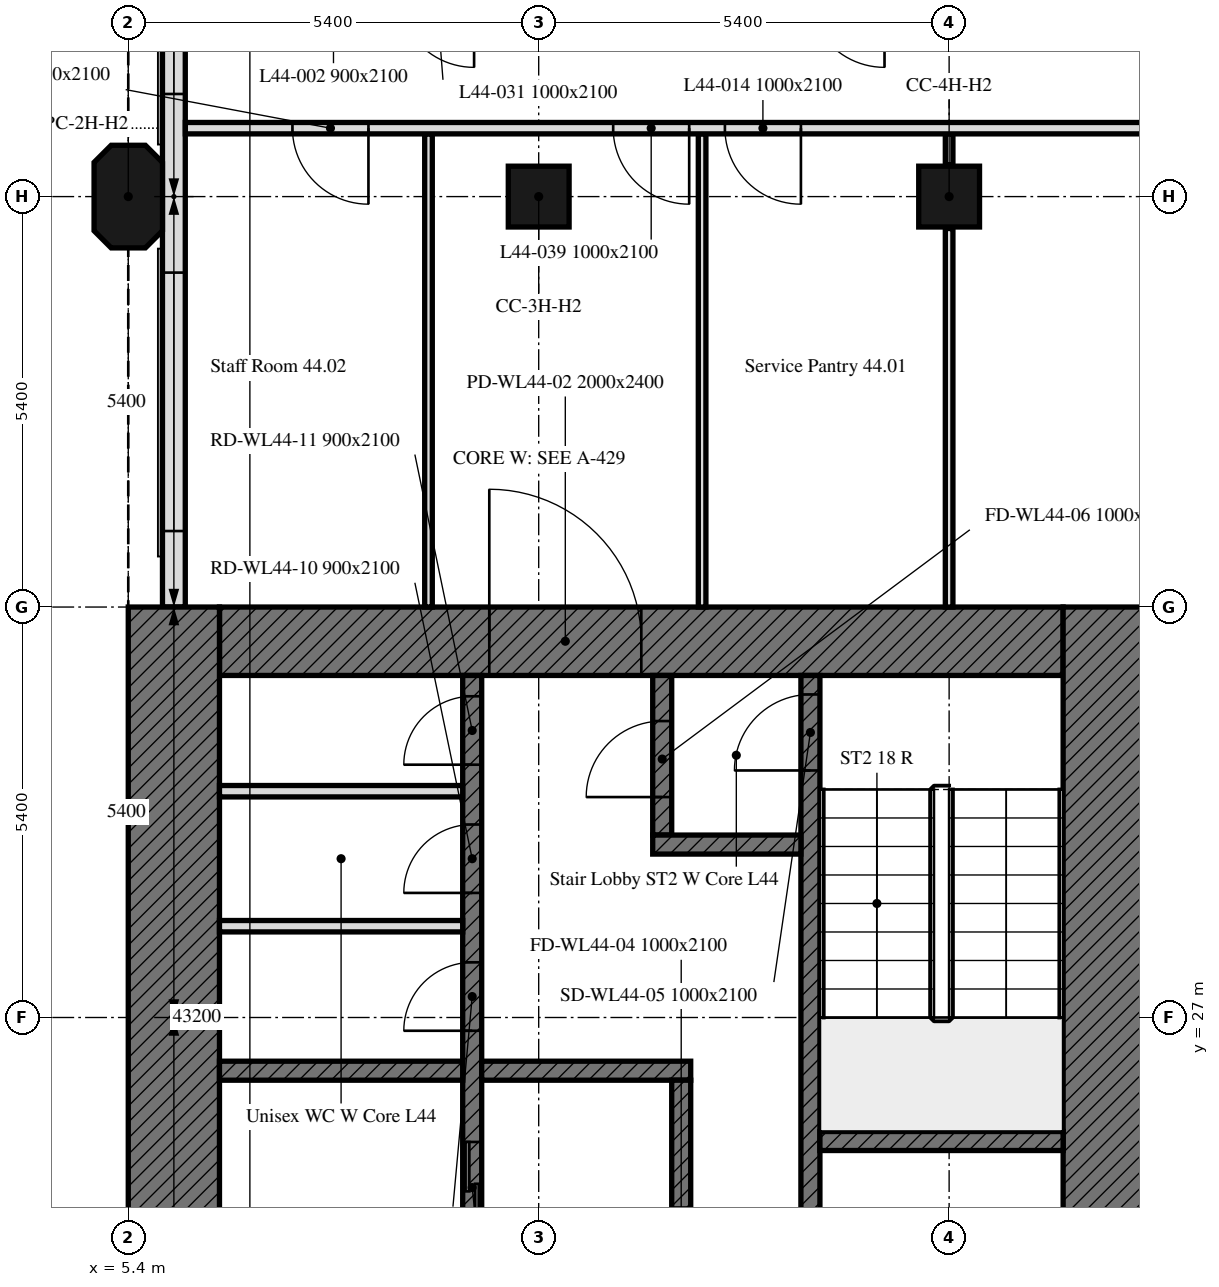
"""IFC4 building model, lengths in metres.
Left out: names, types, materials, properties, quantities, classifications, styles, units other than length and angle.
Written with IfcOpenShell. Run it as: python <this file> out.ifc"""

import sys

from ifc_helpers import new_model, si_unit, direction, frame, frame_2d, origin, origin_2d, place, context, subcontext, project, spatial, polyline, rectangle, outline, extrude, element, fill, save


model = new_model("IFC4")
c1 = context("Model", 3, precision=1e-05, world=origin(), true_north=direction((0.0, 1.0)))
c2 = subcontext(c1, "Body", "Model", "MODEL_VIEW")
j1 = project(units=[si_unit("LENGTHUNIT", "METRE"), si_unit("PLANEANGLEUNIT", "RADIAN")], contexts=[c1])
p1 = place(None, origin())
s1 = spatial("IfcSite", under=j1, at=p1, CompositionType="ELEMENT")
p2 = place(p1, origin())
s2 = spatial("IfcBuilding", under=s1, at=p2, CompositionType="ELEMENT")
p3 = place(p2, frame((0.0, 0.0, 184.0)))
s3 = spatial("IfcBuildingStorey", under=s2, at=p3, CompositionType="ELEMENT", Elevation=184.0)
p4 = place(p3, frame((5.4, 37.8, 0.0), z_axis=(0.0, 0.0, 1.0), x_axis=(0.0, 1.0, 0.0)))
e1 = element("IfcColumn", 1, at=p4, inside=s3, PredefinedType="COLUMN", context=c2, shape_type="SweptSolid", body=[
    extrude(outline(polyline([(-0.45, -0.45), (0.45, -0.45), (0.675, -0.225), (0.675, 0.225), (0.45, 0.45), (-0.45, 0.45), (-0.675, 0.225), (-0.675, -0.225), (-0.45, -0.45)])), origin(), (0.0, 0.0, 1.0), 3.0),
])
for number, where, z_axis, x_axis in (
    (2, (10.8, 37.8, 0.0), (0.0, 0.0, 1.0), (1.0, 0.0, 0.0)),
    (3, (16.2, 37.8, 0.0), (0.0, 0.0, 1.0), (1.0, 0.0, 0.0)),
):
    element("IfcColumn", number, at=place(p3, frame(where, z_axis=z_axis, x_axis=x_axis)), inside=s3, PredefinedType="COLUMN", context=c2, shape_type="SweptSolid", body=[
        extrude(rectangle(XDim=0.8, YDim=0.8, at=origin_2d()), origin(), (0.0, 0.0, 1.0), 3.0),
    ])
p5 = place(p3, frame((6.0, 43.014, 0.0), z_axis=(0.0, 0.0, 1.0), x_axis=(0.0, -1.0, 0.0)))
e4 = element("IfcWall", 4, at=p5, inside=s3, PredefinedType="SOLIDWALL", context=c2, shape_type="SweptSolid", body=[
    extrude(rectangle(XDim=10.614, YDim=0.3, at=frame_2d((5.307, 0.0))), origin(), (0.0, 0.0, 1.0), 3.0),
])
p6 = place(p5, frame((1.164, 0.0, 0.9)))
e5 = element("IfcOpeningElement", 5, at=p6, cuts=e4, PredefinedType="OPENING", context=c2, shape_type="SweptSolid", body=[
    extrude(rectangle(XDim=1.1, YDim=1.7, at=frame_2d((0.55, 0.85))), frame((0.0, 0.16, 0.0), z_axis=(0.0, -1.0, 0.0), x_axis=(1.0, 0.0, 0.0)), (0.0, 0.0, 1.0), 0.32),
])
p7 = place(p5, frame((2.764, 0.0, 0.9)))
e6 = element("IfcOpeningElement", 6, at=p7, cuts=e4, PredefinedType="OPENING", context=c2, shape_type="SweptSolid", body=[
    extrude(rectangle(XDim=1.1, YDim=1.7, at=frame_2d((0.55, 0.85))), frame((0.0, 0.16, 0.0), z_axis=(0.0, -1.0, 0.0), x_axis=(1.0, 0.0, 0.0)), (0.0, 0.0, 1.0), 0.32),
])
p8 = place(p5, frame((6.214, 0.0, 0.9)))
e7 = element("IfcOpeningElement", 7, at=p8, cuts=e4, PredefinedType="OPENING", context=c2, shape_type="SweptSolid", body=[
    extrude(rectangle(XDim=3.4, YDim=1.7, at=frame_2d((1.7, 0.85))), frame((0.0, 0.16, 0.0), z_axis=(0.0, -1.0, 0.0), x_axis=(1.0, 0.0, 0.0)), (0.0, 0.0, 1.0), 0.32),
])
p9 = place(p3, frame((6.6, 31.95, 0.0), z_axis=(0.0, 0.0, 1.0), x_axis=(1.0, 0.0, 0.0)))
e8 = element("IfcWall", 8, at=p9, inside=s3, PredefinedType="SOLIDWALL", context=c2, shape_type="SweptSolid", body=[
    extrude(rectangle(XDim=11.1, YDim=0.9, at=frame_2d((5.55, 0.0))), origin(), (0.0, 0.0, 1.0), 3.0),
])
p10 = place(p9, frame((3.55, 0.0, 0.0)))
e9 = element("IfcOpeningElement", 9, at=p10, cuts=e8, PredefinedType="OPENING", context=c2, shape_type="SweptSolid", body=[
    extrude(rectangle(XDim=2.0, YDim=2.4, at=frame_2d((1.0, 1.2))), frame((0.0, 0.45, 0.0), z_axis=(0.0, -1.0, 0.0), x_axis=(1.0, 0.0, 0.0)), (0.0, 0.0, 1.0), 0.9),
])
for number, where, z_axis, x_axis in (
    (10, (6.0, 16.2, 0.0), (0.0, 0.0, 1.0), (0.0, 1.0, 0.0)),
    (11, (18.3, 32.4, 0.0), (0.0, 0.0, 1.0), (0.0, -1.0, 0.0)),
):
    element("IfcWall", number, at=place(p3, frame(where, z_axis=z_axis, x_axis=x_axis)), inside=s3, PredefinedType="SOLIDWALL", context=c2, shape_type="SweptSolid", body=[
        extrude(rectangle(XDim=16.2, YDim=1.2, at=frame_2d((8.1, 0.0))), origin(), (0.0, 0.0, 1.0), 3.0),
    ])
p11 = place(p3, frame((9.925, 17.1, 0.0), z_axis=(0.0, 0.0, 1.0), x_axis=(0.0, 1.0, 0.0)))
e12 = element("IfcWall", 12, at=p11, inside=s3, PredefinedType="SOLIDWALL", context=c2, shape_type="SweptSolid", body=[
    extrude(rectangle(XDim=14.4, YDim=0.25, at=frame_2d((7.2, 0.0))), origin(), (0.0, 0.0, 1.0), 3.0),
])
p12 = place(p11, frame((4.6, 0.0, 0.0)))
e13 = element("IfcOpeningElement", 13, at=p12, cuts=e12, PredefinedType="OPENING", context=c2, shape_type="SweptSolid", body=[
    extrude(rectangle(XDim=1.0, YDim=2.1, at=frame_2d((0.5, 1.05))), frame((0.0, 0.125, 0.0), z_axis=(0.0, -1.0, 0.0), x_axis=(1.0, 0.0, 0.0)), (0.0, 0.0, 1.0), 0.25),
])
p13 = place(p11, frame((7.062, 0.0, 0.0)))
e14 = element("IfcOpeningElement", 14, at=p13, cuts=e12, PredefinedType="OPENING", context=c2, shape_type="SweptSolid", body=[
    extrude(rectangle(XDim=1.2, YDim=2.1, at=frame_2d((0.6, 1.05))), frame((0.0, 0.125, 0.0), z_axis=(0.0, -1.0, 0.0), x_axis=(1.0, 0.0, 0.0)), (0.0, 0.0, 1.0), 0.25),
])
p14 = place(p11, frame((9.726, 0.0, 0.0)))
e15 = element("IfcOpeningElement", 15, at=p14, cuts=e12, PredefinedType="OPENING", context=c2, shape_type="SweptSolid", body=[
    extrude(rectangle(XDim=0.9, YDim=2.1, at=frame_2d((0.45, 1.05))), frame((0.0, 0.125, 0.0), z_axis=(0.0, -1.0, 0.0), x_axis=(1.0, 0.0, 0.0)), (0.0, 0.0, 1.0), 0.25),
])
p15 = place(p11, frame((11.539, 0.0, 0.0)))
e16 = element("IfcOpeningElement", 16, at=p15, cuts=e12, PredefinedType="OPENING", context=c2, shape_type="SweptSolid", body=[
    extrude(rectangle(XDim=0.9, YDim=2.1, at=frame_2d((0.45, 1.05))), frame((0.0, 0.125, 0.0), z_axis=(0.0, -1.0, 0.0), x_axis=(1.0, 0.0, 0.0)), (0.0, 0.0, 1.0), 0.25),
])
p16 = place(p11, frame((13.226, 0.0, 0.0)))
e17 = element("IfcOpeningElement", 17, at=p16, cuts=e12, PredefinedType="OPENING", context=c2, shape_type="SweptSolid", body=[
    extrude(rectangle(XDim=0.9, YDim=2.1, at=frame_2d((0.45, 1.05))), frame((0.0, 0.125, 0.0), z_axis=(0.0, -1.0, 0.0), x_axis=(1.0, 0.0, 0.0)), (0.0, 0.0, 1.0), 0.25),
])
p17 = place(p3, frame((14.375, 17.1, 0.0), z_axis=(0.0, 0.0, 1.0), x_axis=(0.0, 1.0, 0.0)))
e18 = element("IfcWall", 18, at=p17, inside=s3, PredefinedType="SOLIDWALL", context=c2, shape_type="SweptSolid", body=[
    extrude(rectangle(XDim=14.4, YDim=0.25, at=frame_2d((7.2, 0.0))), origin(), (0.0, 0.0, 1.0), 3.0),
])
p18 = place(p17, frame((13.15, 0.0, 0.0)))
e19 = element("IfcOpeningElement", 19, at=p18, cuts=e18, PredefinedType="OPENING", context=c2, shape_type="SweptSolid", body=[
    extrude(rectangle(XDim=1.0, YDim=2.1, at=frame_2d((0.5, 1.05))), frame((0.0, 0.125, 0.0), z_axis=(0.0, -1.0, 0.0), x_axis=(1.0, 0.0, 0.0)), (0.0, 0.0, 1.0), 0.25),
])
p19 = place(p17, frame((0.6, 0.0, 0.0)))
e20 = element("IfcOpeningElement", 20, at=p19, cuts=e18, PredefinedType="OPENING", context=c2, shape_type="SweptSolid", body=[
    extrude(rectangle(XDim=1.1, YDim=2.1, at=frame_2d((0.55, 1.05))), frame((0.0, 0.125, 0.0), z_axis=(0.0, -1.0, 0.0), x_axis=(1.0, 0.0, 0.0)), (0.0, 0.0, 1.0), 0.25),
])
p20 = place(p17, frame((3.25, 0.0, 0.0)))
e21 = element("IfcOpeningElement", 21, at=p20, cuts=e18, PredefinedType="OPENING", context=c2, shape_type="SweptSolid", body=[
    extrude(rectangle(XDim=0.9, YDim=2.1, at=frame_2d((0.45, 1.05))), frame((0.0, 0.125, 0.0), z_axis=(0.0, -1.0, 0.0), x_axis=(1.0, 0.0, 0.0)), (0.0, 0.0, 1.0), 0.25),
])
for number, where, z_axis, x_axis in (
    (22, (14.5, 25.375, 0.0), (0.0, 0.0, 1.0), (1.0, 0.0, 0.0)),
    (23, (6.6, 26.3, 0.0), (0.0, 0.0, 1.0), (1.0, 0.0, 0.0)),
):
    element("IfcWall", number, at=place(p3, frame(where, z_axis=z_axis, x_axis=x_axis)), inside=s3, PredefinedType="SOLIDWALL", context=c2, shape_type="SweptSolid", body=[
        extrude(rectangle(XDim=3.2, YDim=0.25, at=frame_2d((1.6, 0.0))), origin(), (0.0, 0.0, 1.0), 3.0),
    ])
p21 = place(p3, frame((10.05, 26.3, 0.0), z_axis=(0.0, 0.0, 1.0), x_axis=(1.0, 0.0, 0.0)))
e24 = element("IfcWall", 24, at=p21, inside=s3, PredefinedType="SOLIDWALL", context=c2, shape_type="SweptSolid", body=[
    extrude(rectangle(XDim=2.75, YDim=0.25, at=frame_2d((1.375, 0.0))), origin(), (0.0, 0.0, 1.0), 3.0),
])
p22 = place(p3, frame((12.425, 29.4, 0.0), z_axis=(0.0, 0.0, 1.0), x_axis=(0.0, 1.0, 0.0)))
e25 = element("IfcWall", 25, at=p22, inside=s3, PredefinedType="SOLIDWALL", context=c2, shape_type="SweptSolid", body=[
    extrude(rectangle(XDim=2.1, YDim=0.25, at=frame_2d((1.05, 0.0))), origin(), (0.0, 0.0, 1.0), 3.0),
])
p23 = place(p22, frame((0.5, 0.0, 0.0)))
e26 = element("IfcOpeningElement", 26, at=p23, cuts=e25, PredefinedType="OPENING", context=c2, shape_type="SweptSolid", body=[
    extrude(rectangle(XDim=1.0, YDim=2.1, at=frame_2d((0.5, 1.05))), frame((0.0, 0.125, 0.0), z_axis=(0.0, -1.0, 0.0), x_axis=(1.0, 0.0, 0.0)), (0.0, 0.0, 1.0), 0.25),
])
p24 = place(p3, frame((12.3, 29.275, 0.0), z_axis=(0.0, 0.0, 1.0), x_axis=(1.0, 0.0, 0.0)))
e27 = element("IfcWall", 27, at=p24, inside=s3, PredefinedType="SOLIDWALL", context=c2, shape_type="SweptSolid", body=[
    extrude(rectangle(XDim=1.95, YDim=0.25, at=frame_2d((0.975, 0.0))), origin(), (0.0, 0.0, 1.0), 3.0),
])
p25 = place(p3, frame((12.675, 20.55, 0.0), z_axis=(0.0, 0.0, 1.0), x_axis=(0.0, 1.0, 0.0)))
e28 = element("IfcWall", 28, at=p25, inside=s3, PredefinedType="SOLIDWALL", context=c2, shape_type="SweptSolid", body=[
    extrude(rectangle(XDim=5.625, YDim=0.25, at=frame_2d((2.812, 0.0))), origin(), (0.0, 0.0, 1.0), 3.0),
])
p26 = place(p25, frame((2.95, 0.0, 0.0)))
e29 = element("IfcOpeningElement", 29, at=p26, cuts=e28, PredefinedType="OPENING", context=c2, shape_type="SweptSolid", body=[
    extrude(rectangle(XDim=1.0, YDim=2.1, at=frame_2d((0.5, 1.05))), frame((0.0, 0.125, 0.0), z_axis=(0.0, -1.0, 0.0), x_axis=(1.0, 0.0, 0.0)), (0.0, 0.0, 1.0), 0.25),
])
for number, where, z_axis, x_axis in (
    (30, (6.6, 28.201, 0.0), (0.0, 0.0, 1.0), (1.0, 0.0, 0.0)),
    (31, (6.6, 29.977, 0.0), (0.0, 0.0, 1.0), (1.0, 0.0, 0.0)),
):
    element("IfcWall", number, at=place(p3, frame(where, z_axis=z_axis, x_axis=x_axis)), inside=s3, PredefinedType="PARTITIONING", context=c2, shape_type="SweptSolid", body=[
        extrude(rectangle(XDim=3.2, YDim=0.15, at=frame_2d((1.6, 0.0))), origin(), (0.0, 0.0, 1.0), 3.0),
    ])
p27 = place(p3, frame((16.2, 38.625, 0.0), z_axis=(0.0, 0.0, 1.0), x_axis=(0.0, -1.0, 0.0)))
e32 = element("IfcWall", 32, at=p27, inside=s3, PredefinedType="PARTITIONING", context=c2, shape_type="SweptSolid", body=[
    extrude(rectangle(XDim=0.405, YDim=0.1, at=frame_2d((0.203, 0.0))), origin(), (0.0, 0.0, 1.0), 2.4),
])
p28 = place(p3, frame((16.2, 37.38, 0.0), z_axis=(0.0, 0.0, 1.0), x_axis=(0.0, -1.0, 0.0)))
e33 = element("IfcWall", 33, at=p28, inside=s3, PredefinedType="PARTITIONING", context=c2, shape_type="SweptSolid", body=[
    extrude(rectangle(XDim=4.98, YDim=0.1, at=frame_2d((2.49, 0.0))), origin(), (0.0, 0.0, 1.0), 2.4),
])
for number, where, z_axis, x_axis in (
    (34, (9.35, 38.625, 0.0), (0.0, 0.0, 1.0), (0.0, -1.0, 0.0)),
    (35, (12.95, 32.4, 0.0), (0.0, 0.0, 1.0), (0.0, 1.0, 0.0)),
):
    element("IfcWall", number, at=place(p3, frame(where, z_axis=z_axis, x_axis=x_axis)), inside=s3, PredefinedType="PARTITIONING", context=c2, shape_type="SweptSolid", body=[
        extrude(rectangle(XDim=6.225, YDim=0.1, at=frame_2d((3.113, 0.0))), origin(), (0.0, 0.0, 1.0), 3.0),
    ])
p29 = place(p3, frame((43.275, 38.7, 0.0), z_axis=(0.0, 0.0, 1.0), x_axis=(-1.0, 0.0, 0.0)))
e36 = element("IfcWall", 36, at=p29, inside=s3, PredefinedType="PARTITIONING", context=c2, shape_type="SweptSolid", body=[
    extrude(rectangle(XDim=37.124, YDim=0.15, at=frame_2d((18.562, 0.0))), origin(), (0.0, 0.0, 1.0), 2.4),
])
p30 = place(p29, frame((18.475, 0.0, 0.0)))
e37 = element("IfcOpeningElement", 37, at=p30, cuts=e36, PredefinedType="OPENING", context=c2, shape_type="SweptSolid", body=[
    extrude(rectangle(XDim=1.0, YDim=2.1, at=frame_2d((0.5, 1.05))), frame((0.0, 0.075, 0.0), z_axis=(0.0, -1.0, 0.0), x_axis=(1.0, 0.0, 0.0)), (0.0, 0.0, 1.0), 0.15),
])
p31 = place(p29, frame((34.715, 0.0, 0.0)))
e38 = element("IfcOpeningElement", 38, at=p31, cuts=e36, PredefinedType="OPENING", context=c2, shape_type="SweptSolid", body=[
    extrude(rectangle(XDim=1.0, YDim=2.1, at=frame_2d((0.5, 1.05))), frame((0.0, 0.075, 0.0), z_axis=(0.0, -1.0, 0.0), x_axis=(1.0, 0.0, 0.0)), (0.0, 0.0, 1.0), 0.15),
])
p32 = place(p29, frame((7.925, 0.0, 0.0)))
e39 = element("IfcOpeningElement", 39, at=p32, cuts=e36, PredefinedType="OPENING", context=c2, shape_type="SweptSolid", body=[
    extrude(rectangle(XDim=1.0, YDim=2.1, at=frame_2d((0.5, 1.05))), frame((0.0, 0.075, 0.0), z_axis=(0.0, -1.0, 0.0), x_axis=(1.0, 0.0, 0.0)), (0.0, 0.0, 1.0), 0.15),
])
p33 = place(p29, frame((29.025, 0.0, 0.0)))
e40 = element("IfcOpeningElement", 40, at=p33, cuts=e36, PredefinedType="OPENING", context=c2, shape_type="SweptSolid", body=[
    extrude(rectangle(XDim=1.0, YDim=2.1, at=frame_2d((0.5, 1.05))), frame((0.0, 0.075, 0.0), z_axis=(0.0, -1.0, 0.0), x_axis=(1.0, 0.0, 0.0)), (0.0, 0.0, 1.0), 0.15),
])
p34 = place(p29, frame((30.495, 0.0, 0.0)))
e41 = element("IfcOpeningElement", 41, at=p34, cuts=e36, PredefinedType="OPENING", context=c2, shape_type="SweptSolid", body=[
    extrude(rectangle(XDim=1.0, YDim=2.1, at=frame_2d((0.5, 1.05))), frame((0.0, 0.075, 0.0), z_axis=(0.0, -1.0, 0.0), x_axis=(1.0, 0.0, 0.0)), (0.0, 0.0, 1.0), 0.15),
])
p35 = place(p29, frame((6.455, 0.0, 0.0)))
e42 = element("IfcOpeningElement", 42, at=p35, cuts=e36, PredefinedType="OPENING", context=c2, shape_type="SweptSolid", body=[
    extrude(rectangle(XDim=1.0, YDim=2.1, at=frame_2d((0.5, 1.05))), frame((0.0, 0.075, 0.0), z_axis=(0.0, -1.0, 0.0), x_axis=(1.0, 0.0, 0.0)), (0.0, 0.0, 1.0), 0.15),
])
p36 = place(p7, origin())
e43 = element("IfcWindow", 43, at=p36, inside=s3, PartitioningType="SINGLE_PANEL", PredefinedType="WINDOW", context=c2, shape_type="SweptSolid", body=[
    extrude(rectangle(XDim=1.1, YDim=1.7, at=frame_2d((0.55, 0.85))), frame((0.0, 0.03, 0.0), z_axis=(0.0, -1.0, 0.0), x_axis=(1.0, 0.0, 0.0)), (0.0, 0.0, 1.0), 0.06),
])
fill(e6, e43)
p37 = place(p8, origin())
e44 = element("IfcWindow", 44, at=p37, inside=s3, PartitioningType="SINGLE_PANEL", PredefinedType="WINDOW", context=c2, shape_type="SweptSolid", body=[
    extrude(rectangle(XDim=3.4, YDim=1.7, at=frame_2d((1.7, 0.85))), frame((0.0, 0.03, 0.0), z_axis=(0.0, -1.0, 0.0), x_axis=(1.0, 0.0, 0.0)), (0.0, 0.0, 1.0), 0.06),
])
fill(e7, e44)
p38 = place(p10, origin())
e45 = element("IfcDoor", 45, at=p38, inside=s3, OperationType="DOUBLE_DOOR_SINGLE_SWING", PredefinedType="DOOR", context=c2, shape_type="SweptSolid", body=[
    extrude(rectangle(XDim=2.0, YDim=2.4, at=frame_2d((1.0, 1.2))), frame((0.0, 0.025, 0.0), z_axis=(0.0, -1.0, 0.0), x_axis=(1.0, 0.0, 0.0)), (0.0, 0.0, 1.0), 0.05),
])
fill(e9, e45)
p39 = place(p18, origin())
e46 = element("IfcDoor", 46, at=p39, inside=s3, OperationType="SINGLE_SWING_LEFT", PredefinedType="DOOR", context=c2, shape_type="SweptSolid", body=[
    extrude(rectangle(XDim=1.0, YDim=2.1, at=frame_2d((0.5, 1.05))), frame((0.0, 0.025, 0.0), z_axis=(0.0, -1.0, 0.0), x_axis=(1.0, 0.0, 0.0)), (0.0, 0.0, 1.0), 0.05),
])
fill(e19, e46)
p40 = place(p23, origin())
e47 = element("IfcDoor", 47, at=p40, inside=s3, OperationType="SINGLE_SWING_LEFT", PredefinedType="DOOR", context=c2, shape_type="SweptSolid", body=[
    extrude(rectangle(XDim=1.0, YDim=2.1, at=frame_2d((0.5, 1.05))), frame((0.0, 0.025, 0.0), z_axis=(0.0, -1.0, 0.0), x_axis=(1.0, 0.0, 0.0)), (0.0, 0.0, 1.0), 0.05),
])
fill(e26, e47)
p41 = place(p13, origin())
e48 = element("IfcDoor", 48, at=p41, inside=s3, OperationType="DOUBLE_DOOR_SLIDING", PredefinedType="DOOR", context=c2, shape_type="SweptSolid", body=[
    extrude(rectangle(XDim=1.2, YDim=2.1, at=frame_2d((0.6, 1.05))), frame((0.0, 0.025, 0.0), z_axis=(0.0, -1.0, 0.0), x_axis=(1.0, 0.0, 0.0)), (0.0, 0.0, 1.0), 0.05),
])
fill(e14, e48)
p42 = place(p14, origin())
e49 = element("IfcDoor", 49, at=p42, inside=s3, OperationType="SINGLE_SWING_LEFT", PredefinedType="DOOR", context=c2, shape_type="SweptSolid", body=[
    extrude(rectangle(XDim=0.9, YDim=2.1, at=frame_2d((0.45, 1.05))), frame((0.0, 0.025, 0.0), z_axis=(0.0, -1.0, 0.0), x_axis=(1.0, 0.0, 0.0)), (0.0, 0.0, 1.0), 0.05),
])
fill(e15, e49)
p43 = place(p15, origin())
e50 = element("IfcDoor", 50, at=p43, inside=s3, OperationType="SINGLE_SWING_LEFT", PredefinedType="DOOR", context=c2, shape_type="SweptSolid", body=[
    extrude(rectangle(XDim=0.9, YDim=2.1, at=frame_2d((0.45, 1.05))), frame((0.0, 0.025, 0.0), z_axis=(0.0, -1.0, 0.0), x_axis=(1.0, 0.0, 0.0)), (0.0, 0.0, 1.0), 0.05),
])
fill(e16, e50)
p44 = place(p16, origin())
e51 = element("IfcDoor", 51, at=p44, inside=s3, OperationType="SINGLE_SWING_LEFT", PredefinedType="DOOR", context=c2, shape_type="SweptSolid", body=[
    extrude(rectangle(XDim=0.9, YDim=2.1, at=frame_2d((0.45, 1.05))), frame((0.0, 0.025, 0.0), z_axis=(0.0, -1.0, 0.0), x_axis=(1.0, 0.0, 0.0)), (0.0, 0.0, 1.0), 0.05),
])
fill(e17, e51)
p45 = place(p31, origin())
e52 = element("IfcDoor", 52, at=p45, inside=s3, OperationType="SINGLE_SWING_LEFT", PredefinedType="DOOR", context=c2, shape_type="SweptSolid", body=[
    extrude(rectangle(XDim=1.0, YDim=2.1, at=frame_2d((0.5, 1.05))), frame((0.0, 0.025, 0.0), z_axis=(0.0, -1.0, 0.0), x_axis=(1.0, 0.0, 0.0)), (0.0, 0.0, 1.0), 0.05),
])
fill(e38, e52)
p46 = place(p33, origin())
e53 = element("IfcDoor", 53, at=p46, inside=s3, OperationType="SINGLE_SWING_RIGHT", PredefinedType="DOOR", context=c2, shape_type="SweptSolid", body=[
    extrude(rectangle(XDim=1.0, YDim=2.1, at=frame_2d((0.5, 1.05))), frame((0.0, 0.025, 0.0), z_axis=(0.0, -1.0, 0.0), x_axis=(1.0, 0.0, 0.0)), (0.0, 0.0, 1.0), 0.05),
])
fill(e40, e53)
p47 = place(p34, origin())
e54 = element("IfcDoor", 54, at=p47, inside=s3, OperationType="SINGLE_SWING_LEFT", PredefinedType="DOOR", context=c2, shape_type="SweptSolid", body=[
    extrude(rectangle(XDim=1.0, YDim=2.1, at=frame_2d((0.5, 1.05))), frame((0.0, 0.025, 0.0), z_axis=(0.0, -1.0, 0.0), x_axis=(1.0, 0.0, 0.0)), (0.0, 0.0, 1.0), 0.05),
])
fill(e41, e54)
save(model, sys.argv[1])
